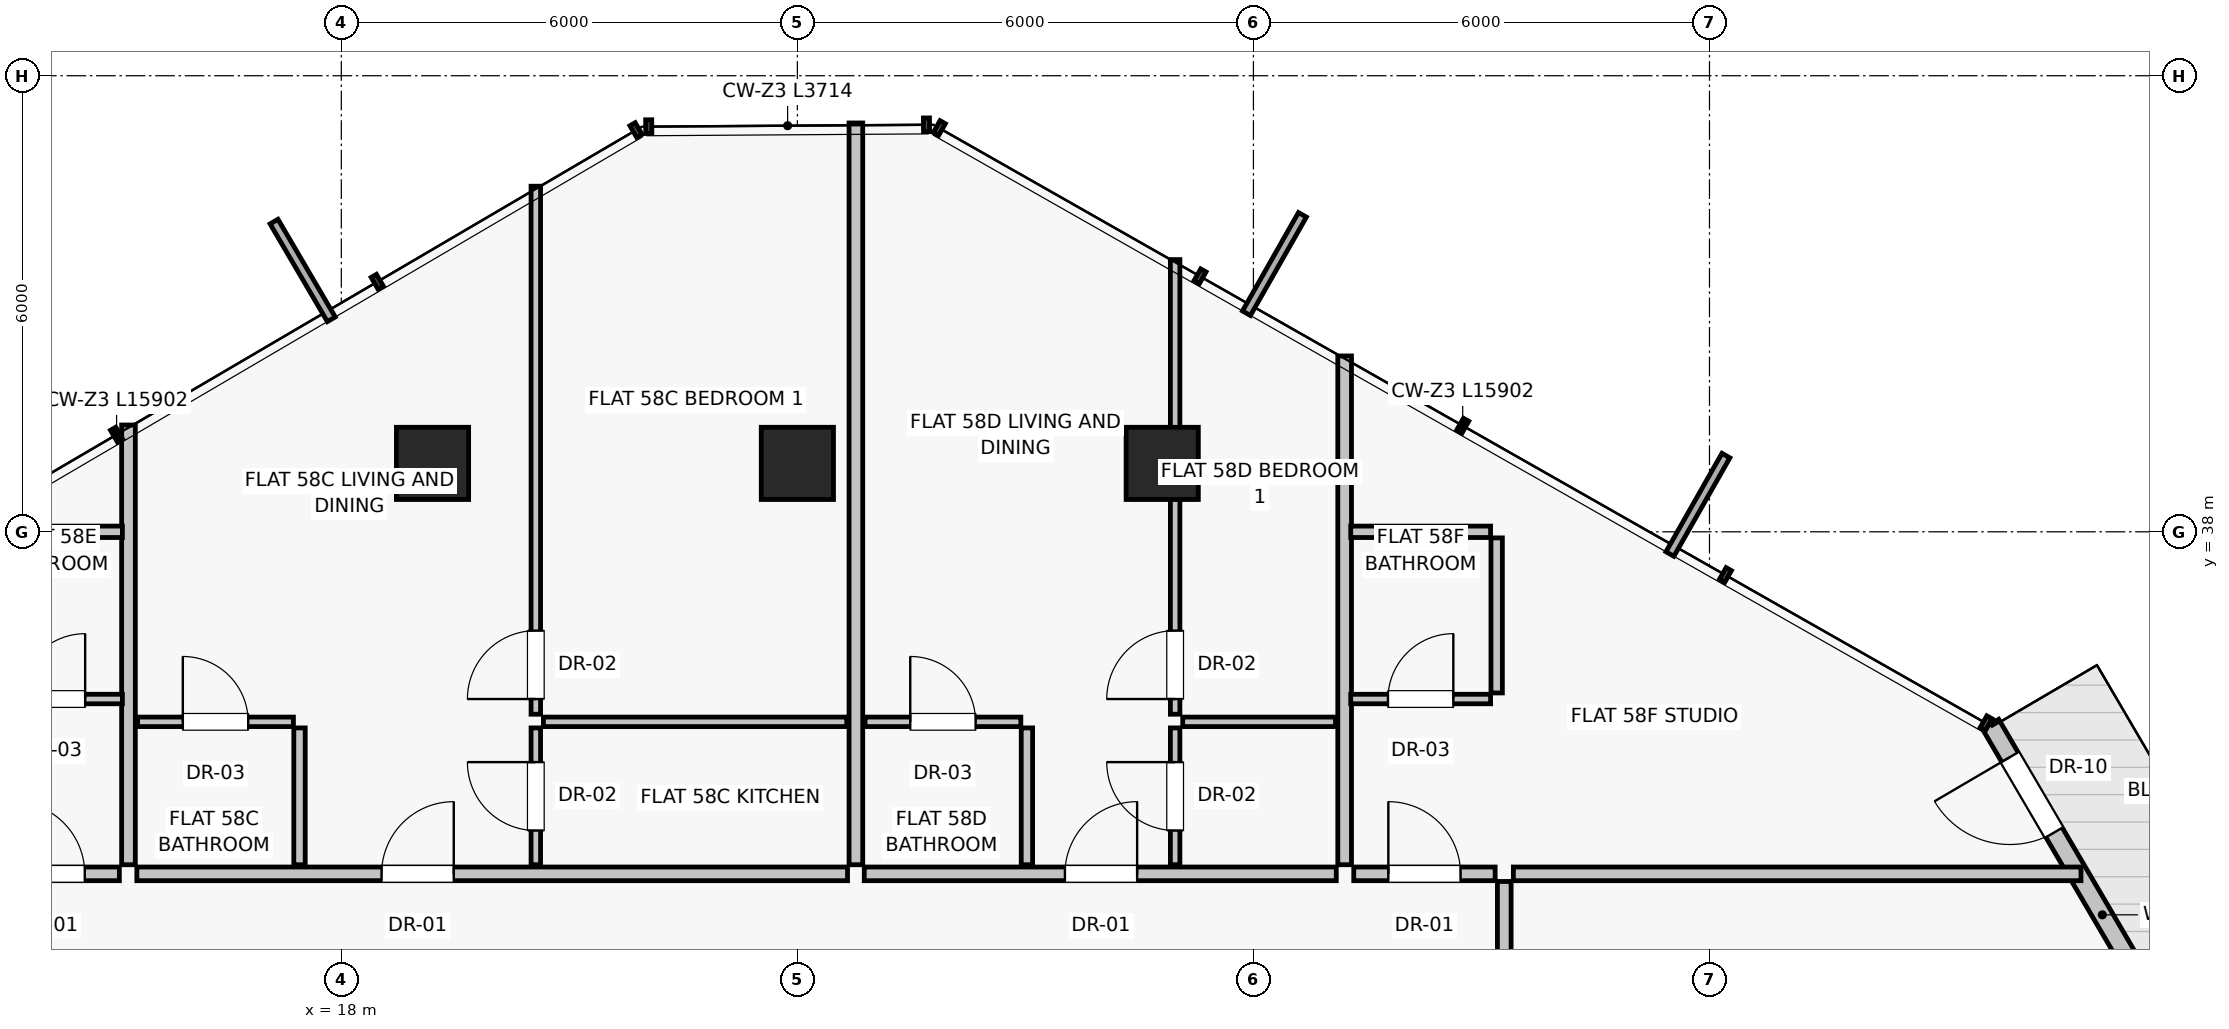
"""IFC4 building model, lengths in metres.
Left out: names, types, materials, properties, quantities, classifications, styles, units other than length and angle.
Written with IfcOpenShell. Run it as: python <this file> out.ifc"""

import sys

from ifc_helpers import new_model, si_unit, direction, frame, frame_2d, origin, origin_2d, place, context, subcontext, project, spatial, rectangle, extrude, source, transform, mapped, element, fill, save


model = new_model("IFC4")
c1 = context("Model", 3, precision=1e-05, world=origin(), true_north=direction((0.0, 1.0)))
c2 = subcontext(c1, "Body", "Model", "MODEL_VIEW")
j1 = project(units=[si_unit("LENGTHUNIT", "METRE"), si_unit("PLANEANGLEUNIT", "RADIAN")], contexts=[c1])
p1 = place(None, origin())
s1 = spatial("IfcSite", under=j1, at=p1, CompositionType="ELEMENT")
p2 = place(p1, origin())
s2 = spatial("IfcBuilding", under=s1, at=p2, CompositionType="ELEMENT")
p3 = place(p2, frame((0.0, 0.0, 204.85)))
s3 = spatial("IfcBuildingStorey", under=s2, at=p3, CompositionType="ELEMENT", Elevation=204.85)
for number, where, z_axis, x_axis in (
    (1, (28.8, 38.9, 0.0), (0.0, 0.0, 1.0), (1.0, 0.0, 0.0)),
    (2, (24.0, 38.9, 0.0), (0.0, 0.0, 1.0), (1.0, 0.0, 0.0)),
    (3, (19.2, 38.9, 0.0), (0.0, 0.0, 1.0), (1.0, 0.0, 0.0)),
):
    element("IfcColumn", number, at=place(p3, frame(where, z_axis=z_axis, x_axis=x_axis)), inside=s3, PredefinedType="COLUMN", context=c2, shape_type="SweptSolid", body=[
        extrude(rectangle(XDim=0.95, YDim=0.95, at=origin_2d()), origin(), (0.0, 0.0, 1.0), 3.25),
    ])
p4 = place(p3, frame((41.677, 32.094, 0.0), z_axis=(0.0, 0.0, 1.0), x_axis=(-0.505746709818, 0.86268201877, 0.0)))
e4 = element("IfcWall", 4, at=p4, inside=s3, PredefinedType="SOLIDWALL", context=c2, shape_type="SweptSolid", body=[
    extrude(rectangle(XDim=3.915, YDim=0.25, at=frame_2d((1.957, 0.0))), origin(), (0.0, 0.0, 1.0), 3.015),
])
p5 = place(p4, frame((2.26, 0.0, 0.0)))
e5 = element("IfcOpeningElement", 5, at=p5, cuts=e4, PredefinedType="OPENING", context=c2, shape_type="SweptSolid", body=[
    extrude(rectangle(XDim=1.15, YDim=2.25, at=frame_2d((0.575, 1.125))), frame((0.0, 0.135, 0.0), z_axis=(0.0, -1.0, 0.0), x_axis=(1.0, 0.0, 0.0)), (0.0, 0.0, 1.0), 0.27),
])
p6 = place(p3, frame((15.2, 33.62, 0.0), z_axis=(0.0, 0.0, 1.0), x_axis=(0.0, 1.0, 0.0)))
e6 = element("IfcWall", 6, at=p6, inside=s3, PredefinedType="PARTITIONING", context=c2, shape_type="SweptSolid", body=[
    extrude(rectangle(XDim=5.785, YDim=0.18, at=frame_2d((2.893, 0.0))), origin(), (0.0, 0.0, 1.0), 3.015),
])
p7 = place(p3, frame((31.2, 33.62, 0.0), z_axis=(0.0, 0.0, 1.0), x_axis=(0.0, 1.0, 0.0)))
e7 = element("IfcWall", 7, at=p7, inside=s3, PredefinedType="PARTITIONING", context=c2, shape_type="SweptSolid", body=[
    extrude(rectangle(XDim=6.693, YDim=0.18, at=frame_2d((3.347, 0.0))), origin(), (0.0, 0.0, 1.0), 3.015),
])
p8 = place(p3, frame((15.31, 33.5, 0.0), z_axis=(0.0, 0.0, 1.0), x_axis=(1.0, 0.0, 0.0)))
e8 = element("IfcWall", 8, at=p8, inside=s3, PredefinedType="PARTITIONING", context=c2, shape_type="SweptSolid", body=[
    extrude(rectangle(XDim=9.35, YDim=0.18, at=frame_2d((4.675, 0.0))), origin(), (0.0, 0.0, 1.0), 3.015),
])
p9 = place(p8, frame((3.219, 0.0, 0.0)))
e9 = element("IfcOpeningElement", 9, at=p9, cuts=e8, PredefinedType="OPENING", context=c2, shape_type="SweptSolid", body=[
    extrude(rectangle(XDim=0.95, YDim=2.02, at=frame_2d((0.475, 1.01))), frame((0.0, 0.1, 0.0), z_axis=(0.0, -1.0, 0.0), x_axis=(1.0, 0.0, 0.0)), (0.0, 0.0, 1.0), 0.2),
])
p10 = place(p3, frame((17.45, 33.62, 0.0), z_axis=(0.0, 0.0, 1.0), x_axis=(0.0, 1.0, 0.0)))
e10 = element("IfcWall", 10, at=p10, inside=s3, PredefinedType="PARTITIONING", context=c2, shape_type="SweptSolid", body=[
    extrude(rectangle(XDim=1.8, YDim=0.15, at=frame_2d((0.9, 0.0))), origin(), (0.0, 0.0, 1.0), 3.015),
])
p11 = place(p3, frame((15.32, 35.5, 0.0), z_axis=(0.0, 0.0, 1.0), x_axis=(1.0, 0.0, 0.0)))
e11 = element("IfcWall", 11, at=p11, inside=s3, PredefinedType="PARTITIONING", context=c2, shape_type="SweptSolid", body=[
    extrude(rectangle(XDim=2.05, YDim=0.125, at=frame_2d((1.025, 0.0))), origin(), (0.0, 0.0, 1.0), 3.015),
])
p12 = place(p11, frame((0.595, 0.0, 0.0)))
e12 = element("IfcOpeningElement", 12, at=p12, cuts=e11, PredefinedType="OPENING", context=c2, shape_type="SweptSolid", body=[
    extrude(rectangle(XDim=0.86, YDim=2.01, at=frame_2d((0.43, 1.005))), frame((0.0, 0.073, 0.0), z_axis=(0.0, -1.0, 0.0), x_axis=(1.0, 0.0, 0.0)), (0.0, 0.0, 1.0), 0.145),
])
p13 = place(p3, frame((20.559, 33.62, 0.0), z_axis=(0.0, 0.0, 1.0), x_axis=(0.0, 1.0, 0.0)))
e13 = element("IfcWall", 13, at=p13, inside=s3, PredefinedType="PARTITIONING", context=c2, shape_type="SweptSolid", body=[
    extrude(rectangle(XDim=1.8, YDim=0.125, at=frame_2d((0.9, 0.0))), origin(), (0.0, 0.0, 1.0), 2.469),
])
p14 = place(p13, frame((0.45, 0.0, 0.0)))
e14 = element("IfcOpeningElement", 14, at=p14, cuts=e13, PredefinedType="OPENING", context=c2, shape_type="SweptSolid", body=[
    extrude(rectangle(XDim=0.9, YDim=2.01, at=frame_2d((0.45, 1.005))), frame((0.0, 0.073, 0.0), z_axis=(0.0, -1.0, 0.0), x_axis=(1.0, 0.0, 0.0)), (0.0, 0.0, 1.0), 0.145),
])
p15 = place(p3, frame((20.659, 35.5, 0.0), z_axis=(0.0, 0.0, 1.0), x_axis=(1.0, 0.0, 0.0)))
e15 = element("IfcWall", 15, at=p15, inside=s3, PredefinedType="PARTITIONING", context=c2, shape_type="SweptSolid", body=[
    extrude(rectangle(XDim=3.991, YDim=0.125, at=frame_2d((1.996, 0.0))), origin(), (0.0, 0.0, 1.0), 2.662),
])
p16 = place(p3, frame((20.559, 35.6, 0.0), z_axis=(0.0, 0.0, 1.0), x_axis=(0.0, 1.0, 0.0)))
e16 = element("IfcWall", 16, at=p16, inside=s3, PredefinedType="PARTITIONING", context=c2, shape_type="SweptSolid", body=[
    extrude(rectangle(XDim=6.947, YDim=0.125, at=frame_2d((3.473, 0.0))), origin(), (0.0, 0.0, 1.0), 3.015),
])
p17 = place(p16, frame((0.2, 0.0, 0.0)))
e17 = element("IfcOpeningElement", 17, at=p17, cuts=e16, PredefinedType="OPENING", context=c2, shape_type="SweptSolid", body=[
    extrude(rectangle(XDim=0.9, YDim=2.01, at=frame_2d((0.45, 1.005))), frame((0.0, 0.073, 0.0), z_axis=(0.0, -1.0, 0.0), x_axis=(1.0, 0.0, 0.0)), (0.0, 0.0, 1.0), 0.145),
])
p18 = place(p3, frame((24.77, 33.62, 0.0), z_axis=(0.0, 0.0, 1.0), x_axis=(0.0, 1.0, 0.0)))
e18 = element("IfcWall", 18, at=p18, inside=s3, PredefinedType="PARTITIONING", context=c2, shape_type="SweptSolid", body=[
    extrude(rectangle(XDim=9.759, YDim=0.18, at=frame_2d((4.879, 0.0))), origin(), (0.0, 0.0, 1.0), 3.015),
])
p19 = place(p3, frame((24.88, 33.5, 0.0), z_axis=(0.0, 0.0, 1.0), x_axis=(1.0, 0.0, 0.0)))
e19 = element("IfcWall", 19, at=p19, inside=s3, PredefinedType="PARTITIONING", context=c2, shape_type="SweptSolid", body=[
    extrude(rectangle(XDim=6.21, YDim=0.18, at=frame_2d((3.105, 0.0))), origin(), (0.0, 0.0, 1.0), 3.015),
])
p20 = place(p19, frame((2.64, 0.0, 0.0)))
e20 = element("IfcOpeningElement", 20, at=p20, cuts=e19, PredefinedType="OPENING", context=c2, shape_type="SweptSolid", body=[
    extrude(rectangle(XDim=0.95, YDim=2.02, at=frame_2d((0.475, 1.01))), frame((0.0, 0.1, 0.0), z_axis=(0.0, -1.0, 0.0), x_axis=(1.0, 0.0, 0.0)), (0.0, 0.0, 1.0), 0.2),
])
p21 = place(p3, frame((27.02, 33.62, 0.0), z_axis=(0.0, 0.0, 1.0), x_axis=(0.0, 1.0, 0.0)))
e21 = element("IfcWall", 21, at=p21, inside=s3, PredefinedType="PARTITIONING", context=c2, shape_type="SweptSolid", body=[
    extrude(rectangle(XDim=1.8, YDim=0.15, at=frame_2d((0.9, 0.0))), origin(), (0.0, 0.0, 1.0), 3.015),
])
p22 = place(p3, frame((24.89, 35.5, 0.0), z_axis=(0.0, 0.0, 1.0), x_axis=(1.0, 0.0, 0.0)))
e22 = element("IfcWall", 22, at=p22, inside=s3, PredefinedType="PARTITIONING", context=c2, shape_type="SweptSolid", body=[
    extrude(rectangle(XDim=2.05, YDim=0.125, at=frame_2d((1.025, 0.0))), origin(), (0.0, 0.0, 1.0), 2.662),
])
p23 = place(p22, frame((0.595, 0.0, 0.0)))
e23 = element("IfcOpeningElement", 23, at=p23, cuts=e22, PredefinedType="OPENING", context=c2, shape_type="SweptSolid", body=[
    extrude(rectangle(XDim=0.86, YDim=2.01, at=frame_2d((0.43, 1.005))), frame((0.0, 0.073, 0.0), z_axis=(0.0, -1.0, 0.0), x_axis=(1.0, 0.0, 0.0)), (0.0, 0.0, 1.0), 0.145),
])
p24 = place(p3, frame((28.97, 33.62, 0.0), z_axis=(0.0, 0.0, 1.0), x_axis=(0.0, 1.0, 0.0)))
e24 = element("IfcWall", 24, at=p24, inside=s3, PredefinedType="PARTITIONING", context=c2, shape_type="SweptSolid", body=[
    extrude(rectangle(XDim=1.8, YDim=0.125, at=frame_2d((0.9, 0.0))), origin(), (0.0, 0.0, 1.0), 3.015),
])
p25 = place(p24, frame((0.45, 0.0, 0.0)))
e25 = element("IfcOpeningElement", 25, at=p25, cuts=e24, PredefinedType="OPENING", context=c2, shape_type="SweptSolid", body=[
    extrude(rectangle(XDim=0.9, YDim=2.01, at=frame_2d((0.45, 1.005))), frame((0.0, 0.073, 0.0), z_axis=(0.0, -1.0, 0.0), x_axis=(1.0, 0.0, 0.0)), (0.0, 0.0, 1.0), 0.145),
])
p26 = place(p3, frame((29.07, 35.5, 0.0), z_axis=(0.0, 0.0, 1.0), x_axis=(1.0, 0.0, 0.0)))
e26 = element("IfcWall", 26, at=p26, inside=s3, PredefinedType="PARTITIONING", context=c2, shape_type="SweptSolid", body=[
    extrude(rectangle(XDim=2.01, YDim=0.125, at=frame_2d((1.005, 0.0))), origin(), (0.0, 0.0, 1.0), 2.662),
])
p27 = place(p3, frame((28.97, 35.6, 0.0), z_axis=(0.0, 0.0, 1.0), x_axis=(0.0, 1.0, 0.0)))
e27 = element("IfcWall", 27, at=p27, inside=s3, PredefinedType="PARTITIONING", context=c2, shape_type="SweptSolid", body=[
    extrude(rectangle(XDim=5.981, YDim=0.125, at=frame_2d((2.991, 0.0))), origin(), (0.0, 0.0, 1.0), 2.469),
])
p28 = place(p27, frame((0.2, 0.0, 0.0)))
e28 = element("IfcOpeningElement", 28, at=p28, cuts=e27, PredefinedType="OPENING", context=c2, shape_type="SweptSolid", body=[
    extrude(rectangle(XDim=0.9, YDim=2.01, at=frame_2d((0.45, 1.005))), frame((0.0, 0.073, 0.0), z_axis=(0.0, -1.0, 0.0), x_axis=(1.0, 0.0, 0.0)), (0.0, 0.0, 1.0), 0.145),
])
p29 = place(p3, frame((33.3, 31.5, 0.0), z_axis=(0.0, 0.0, 1.0), x_axis=(0.0, 1.0, 0.0)))
e29 = element("IfcWall", 29, at=p29, inside=s3, PredefinedType="PARTITIONING", context=c2, shape_type="SweptSolid", body=[
    extrude(rectangle(XDim=1.9, YDim=0.18, at=frame_2d((0.95, 0.0))), origin(), (0.0, 0.0, 1.0), 3.015),
])
p30 = place(p3, frame((13.22, 33.5, 0.0), z_axis=(0.0, 0.0, 1.0), x_axis=(1.0, 0.0, 0.0)))
e30 = element("IfcWall", 30, at=p30, inside=s3, PredefinedType="PARTITIONING", context=c2, shape_type="SweptSolid", body=[
    extrude(rectangle(XDim=1.86, YDim=0.18, at=frame_2d((0.93, 0.0))), origin(), (0.0, 0.0, 1.0), 3.015),
])
p31 = place(p30, frame((0.455, 0.0, 0.0)))
e31 = element("IfcOpeningElement", 31, at=p31, cuts=e30, PredefinedType="OPENING", context=c2, shape_type="SweptSolid", body=[
    extrude(rectangle(XDim=0.95, YDim=2.02, at=frame_2d((0.475, 1.01))), frame((0.0, 0.1, 0.0), z_axis=(0.0, -1.0, 0.0), x_axis=(1.0, 0.0, 0.0)), (0.0, 0.0, 1.0), 0.2),
])
p32 = place(p3, frame((13.28, 35.8, 0.0), z_axis=(0.0, 0.0, 1.0), x_axis=(1.0, 0.0, 0.0)))
e32 = element("IfcWall", 32, at=p32, inside=s3, PredefinedType="PARTITIONING", context=c2, shape_type="SweptSolid", body=[
    extrude(rectangle(XDim=1.84, YDim=0.125, at=frame_2d((0.92, 0.0))), origin(), (0.0, 0.0, 1.0), 3.015),
])
p33 = place(p32, frame((0.49, 0.0, 0.0)))
e33 = element("IfcOpeningElement", 33, at=p33, cuts=e32, PredefinedType="OPENING", context=c2, shape_type="SweptSolid", body=[
    extrude(rectangle(XDim=0.86, YDim=2.01, at=frame_2d((0.43, 1.005))), frame((0.0, 0.073, 0.0), z_axis=(0.0, -1.0, 0.0), x_axis=(1.0, 0.0, 0.0)), (0.0, 0.0, 1.0), 0.145),
])
p34 = place(p3, frame((13.28, 38.0, 0.0), z_axis=(0.0, 0.0, 1.0), x_axis=(1.0, 0.0, 0.0)))
e34 = element("IfcWall", 34, at=p34, inside=s3, PredefinedType="PARTITIONING", context=c2, shape_type="SweptSolid", body=[
    extrude(rectangle(XDim=1.84, YDim=0.15, at=frame_2d((0.92, 0.0))), origin(), (0.0, 0.0, 1.0), 3.015),
])
p35 = place(p3, frame((33.42, 33.5, 0.0), z_axis=(0.0, 0.0, 1.0), x_axis=(1.0, 0.0, 0.0)))
e35 = element("IfcWall", 35, at=p35, inside=s3, PredefinedType="PARTITIONING", context=c2, shape_type="SweptSolid", body=[
    extrude(rectangle(XDim=7.468, YDim=0.18, at=frame_2d((3.734, 0.0))), origin(), (0.0, 0.0, 1.0), 3.015),
])
p36 = place(p3, frame((31.32, 33.5, 0.0), z_axis=(0.0, 0.0, 1.0), x_axis=(1.0, 0.0, 0.0)))
e36 = element("IfcWall", 36, at=p36, inside=s3, PredefinedType="PARTITIONING", context=c2, shape_type="SweptSolid", body=[
    extrude(rectangle(XDim=1.86, YDim=0.18, at=frame_2d((0.93, 0.0))), origin(), (0.0, 0.0, 1.0), 3.015),
])
p37 = place(p36, frame((0.455, 0.0, 0.0)))
e37 = element("IfcOpeningElement", 37, at=p37, cuts=e36, PredefinedType="OPENING", context=c2, shape_type="SweptSolid", body=[
    extrude(rectangle(XDim=0.95, YDim=2.02, at=frame_2d((0.475, 1.01))), frame((0.0, 0.1, 0.0), z_axis=(0.0, -1.0, 0.0), x_axis=(1.0, 0.0, 0.0)), (0.0, 0.0, 1.0), 0.2),
])
p38 = place(p3, frame((31.28, 35.8, 0.0), z_axis=(0.0, 0.0, 1.0), x_axis=(1.0, 0.0, 0.0)))
e38 = element("IfcWall", 38, at=p38, inside=s3, PredefinedType="PARTITIONING", context=c2, shape_type="SweptSolid", body=[
    extrude(rectangle(XDim=1.84, YDim=0.125, at=frame_2d((0.92, 0.0))), origin(), (0.0, 0.0, 1.0), 3.015),
])
p39 = place(p38, frame((0.49, 0.0, 0.0)))
e39 = element("IfcOpeningElement", 39, at=p39, cuts=e38, PredefinedType="OPENING", context=c2, shape_type="SweptSolid", body=[
    extrude(rectangle(XDim=0.86, YDim=2.01, at=frame_2d((0.43, 1.005))), frame((0.0, 0.073, 0.0), z_axis=(0.0, -1.0, 0.0), x_axis=(1.0, 0.0, 0.0)), (0.0, 0.0, 1.0), 0.145),
])
p40 = place(p3, frame((31.28, 38.0, 0.0), z_axis=(0.0, 0.0, 1.0), x_axis=(1.0, 0.0, 0.0)))
e40 = element("IfcWall", 40, at=p40, inside=s3, PredefinedType="PARTITIONING", context=c2, shape_type="SweptSolid", body=[
    extrude(rectangle(XDim=1.84, YDim=0.15, at=frame_2d((0.92, 0.0))), origin(), (0.0, 0.0, 1.0), 3.015),
])
p41 = place(p3, frame((33.2, 35.88, 0.0), z_axis=(0.0, 0.0, 1.0), x_axis=(0.0, 1.0, 0.0)))
e41 = element("IfcWall", 41, at=p41, inside=s3, PredefinedType="PARTITIONING", context=c2, shape_type="SweptSolid", body=[
    extrude(rectangle(XDim=2.04, YDim=0.15, at=frame_2d((1.02, 0.0))), origin(), (0.0, 0.0, 1.0), 3.015),
])
m1 = source(origin(), c2, "Body", "SweptSolid", [
    extrude(rectangle(XDim=1.15, YDim=2.25, at=frame_2d((0.575, 1.125))), frame((0.0, 0.025, 0.0), z_axis=(0.0, -1.0, 0.0), x_axis=(1.0, 0.0, 0.0)), (0.0, 0.0, 1.0), 0.05),
])
p42 = place(p5, frame((1.15, 0.0, 0.0), z_axis=(0.0, 0.0, 1.0), x_axis=(-1.0, 0.0, 0.0)))
e42 = element("IfcDoor", 42, at=p42, inside=s3, OperationType="SINGLE_SWING_RIGHT", PredefinedType="DOOR", context=c2, shape_type="MappedRepresentation", body=[
    mapped(m1, transform((0.0, 0.0, 0.0), scale=1.0)),
])
fill(e5, e42)
m2 = source(origin(), c2, "Body", "SweptSolid", [
    extrude(rectangle(XDim=0.95, YDim=2.02, at=frame_2d((0.475, 1.01))), frame((0.0, 0.025, 0.0), z_axis=(0.0, -1.0, 0.0), x_axis=(1.0, 0.0, 0.0)), (0.0, 0.0, 1.0), 0.05),
])
p43 = place(p9, origin())
e43 = element("IfcDoor", 43, at=p43, inside=s3, OperationType="SINGLE_SWING_RIGHT", PredefinedType="DOOR", context=c2, shape_type="MappedRepresentation", body=[
    mapped(m2, transform((0.0, 0.0, 0.0), scale=1.0)),
])
fill(e9, e43)
m3 = source(origin(), c2, "Body", "SweptSolid", [
    extrude(rectangle(XDim=0.86, YDim=2.01, at=frame_2d((0.43, 1.005))), frame((0.0, 0.025, 0.0), z_axis=(0.0, -1.0, 0.0), x_axis=(1.0, 0.0, 0.0)), (0.0, 0.0, 1.0), 0.05),
])
p44 = place(p12, origin())
e44 = element("IfcDoor", 44, at=p44, inside=s3, OperationType="SINGLE_SWING_LEFT", PredefinedType="DOOR", context=c2, shape_type="MappedRepresentation", body=[
    mapped(m3, transform((0.0, 0.0, 0.0), scale=1.0)),
])
fill(e12, e44)
m4 = source(origin(), c2, "Body", "SweptSolid", [
    extrude(rectangle(XDim=0.9, YDim=2.01, at=frame_2d((0.45, 1.005))), frame((0.0, 0.025, 0.0), z_axis=(0.0, -1.0, 0.0), x_axis=(1.0, 0.0, 0.0)), (0.0, 0.0, 1.0), 0.05),
])
p45 = place(p14, origin())
e45 = element("IfcDoor", 45, at=p45, inside=s3, OperationType="SINGLE_SWING_RIGHT", PredefinedType="DOOR", context=c2, shape_type="MappedRepresentation", body=[
    mapped(m4, transform((0.0, 0.0, 0.0), scale=1.0)),
])
fill(e14, e45)
p46 = place(p17, origin())
e46 = element("IfcDoor", 46, at=p46, inside=s3, OperationType="SINGLE_SWING_LEFT", PredefinedType="DOOR", context=c2, shape_type="MappedRepresentation", body=[
    mapped(m4, transform((0.0, 0.0, 0.0), scale=1.0)),
])
fill(e17, e46)
p47 = place(p20, origin())
e47 = element("IfcDoor", 47, at=p47, inside=s3, OperationType="SINGLE_SWING_RIGHT", PredefinedType="DOOR", context=c2, shape_type="MappedRepresentation", body=[
    mapped(m2, transform((0.0, 0.0, 0.0), scale=1.0)),
])
fill(e20, e47)
p48 = place(p23, origin())
e48 = element("IfcDoor", 48, at=p48, inside=s3, OperationType="SINGLE_SWING_LEFT", PredefinedType="DOOR", context=c2, shape_type="MappedRepresentation", body=[
    mapped(m3, transform((0.0, 0.0, 0.0), scale=1.0)),
])
fill(e23, e48)
p49 = place(p25, origin())
e49 = element("IfcDoor", 49, at=p49, inside=s3, OperationType="SINGLE_SWING_RIGHT", PredefinedType="DOOR", context=c2, shape_type="MappedRepresentation", body=[
    mapped(m4, transform((0.0, 0.0, 0.0), scale=1.0)),
])
fill(e25, e49)
p50 = place(p28, origin())
e50 = element("IfcDoor", 50, at=p50, inside=s3, OperationType="SINGLE_SWING_LEFT", PredefinedType="DOOR", context=c2, shape_type="MappedRepresentation", body=[
    mapped(m4, transform((0.0, 0.0, 0.0), scale=1.0)),
])
fill(e28, e50)
p51 = place(p31, origin())
e51 = element("IfcDoor", 51, at=p51, inside=s3, OperationType="SINGLE_SWING_LEFT", PredefinedType="DOOR", context=c2, shape_type="MappedRepresentation", body=[
    mapped(m2, transform((0.0, 0.0, 0.0), scale=1.0)),
])
fill(e31, e51)
p52 = place(p33, origin())
e52 = element("IfcDoor", 52, at=p52, inside=s3, OperationType="SINGLE_SWING_RIGHT", PredefinedType="DOOR", context=c2, shape_type="MappedRepresentation", body=[
    mapped(m3, transform((0.0, 0.0, 0.0), scale=1.0)),
])
fill(e33, e52)
p53 = place(p37, origin())
e53 = element("IfcDoor", 53, at=p53, inside=s3, OperationType="SINGLE_SWING_LEFT", PredefinedType="DOOR", context=c2, shape_type="MappedRepresentation", body=[
    mapped(m2, transform((0.0, 0.0, 0.0), scale=1.0)),
])
fill(e37, e53)
p54 = place(p39, origin())
e54 = element("IfcDoor", 54, at=p54, inside=s3, OperationType="SINGLE_SWING_RIGHT", PredefinedType="DOOR", context=c2, shape_type="MappedRepresentation", body=[
    mapped(m3, transform((0.0, 0.0, 0.0), scale=1.0)),
])
fill(e39, e54)
save(model, sys.argv[1])
